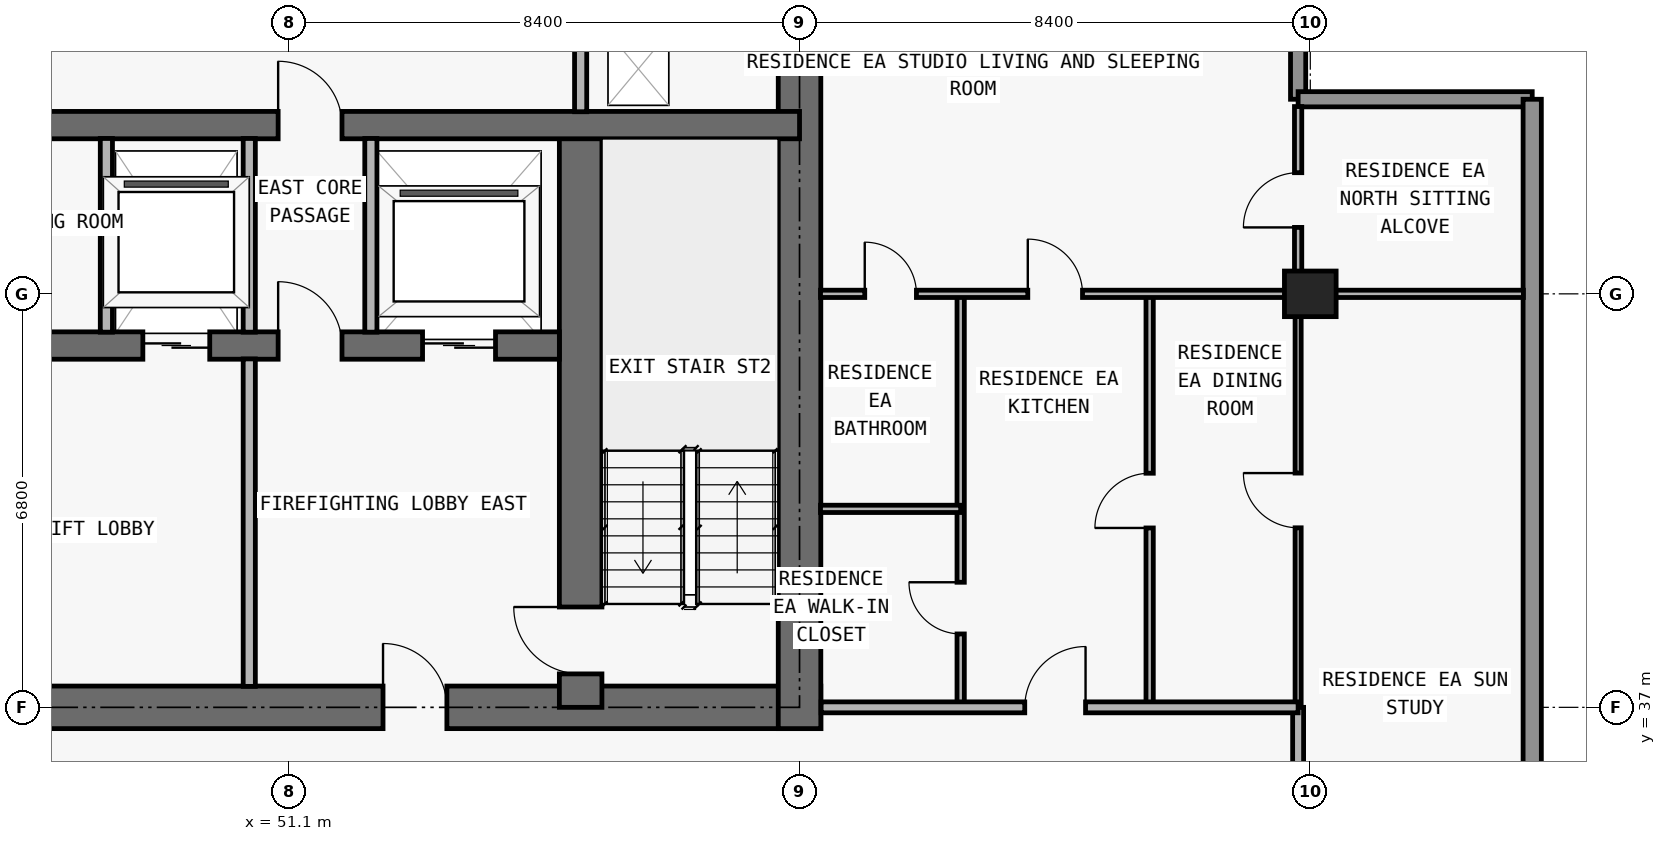
"""IFC4 building model, lengths in metres.
Left out: names, types, materials, properties, quantities, classifications, styles, units other than length and angle.
Written with IfcOpenShell. Run it as: python <this file> out.ifc"""

import sys

from ifc_helpers import new_model, si_unit, direction, frame, frame_2d, origin, origin_2d, place, context, subcontext, project, spatial, rectangle, extrude, element, fill, save


model = new_model("IFC4")
c1 = context("Model", 3, precision=1e-05, world=origin(), true_north=direction((0.0, 1.0)))
c2 = subcontext(c1, "Body", "Model", "MODEL_VIEW")
j1 = project(units=[si_unit("LENGTHUNIT", "METRE"), si_unit("PLANEANGLEUNIT", "RADIAN")], contexts=[c1])
p1 = place(None, origin())
s1 = spatial("IfcSite", under=j1, at=p1, CompositionType="ELEMENT")
p2 = place(p1, origin())
s2 = spatial("IfcBuilding", under=s1, at=p2, CompositionType="ELEMENT")
p3 = place(p2, frame((0.0, 0.0, 218.1)))
s3 = spatial("IfcBuildingStorey", under=s2, at=p3, CompositionType="ELEMENT", Elevation=218.1)
p4 = place(p3, frame((67.9, 43.8, 0.0), z_axis=(0.0, 0.0, 1.0), x_axis=(1.0, 0.0, 0.0)))
e1 = element("IfcColumn", 1, at=p4, inside=s3, PredefinedType="COLUMN", context=c2, shape_type="SweptSolid", body=[
    extrude(rectangle(XDim=0.85, YDim=0.75, at=origin_2d()), origin(), (0.0, 0.0, 1.0), 3.0),
])
p5 = place(p3, frame((17.95, 37.0, 0.0), z_axis=(0.0, 0.0, 1.0), x_axis=(1.0, 0.0, 0.0)))
e2 = element("IfcWall", 2, at=p5, inside=s3, PredefinedType="SHEAR", context=c2, shape_type="SweptSolid", body=[
    extrude(rectangle(XDim=41.9, YDim=0.7, at=frame_2d((20.95, 0.0))), origin(), (0.0, 0.0, 1.0), 3.0),
])
p6 = place(p5, frame((14.35, 0.0, 0.0)))
e3 = element("IfcOpeningElement", 3, at=p6, cuts=e2, PredefinedType="OPENING", context=c2, shape_type="SweptSolid", body=[
    extrude(rectangle(XDim=1.1, YDim=2.15, at=frame_2d((0.55, 1.075))), frame((0.0, 0.36, 0.0), z_axis=(0.0, -1.0, 0.0), x_axis=(1.0, 0.0, 0.0)), (0.0, 0.0, 1.0), 0.72),
])
p7 = place(p5, frame((6.2, 0.0, 0.0)))
e4 = element("IfcOpeningElement", 4, at=p7, cuts=e2, PredefinedType="OPENING", context=c2, shape_type="SweptSolid", body=[
    extrude(rectangle(XDim=1.05, YDim=2.15, at=frame_2d((0.525, 1.075))), frame((0.0, 0.36, 0.0), z_axis=(0.0, -1.0, 0.0), x_axis=(1.0, 0.0, 0.0)), (0.0, 0.0, 1.0), 0.72),
])
p8 = place(p5, frame((34.7, 0.0, 0.0)))
e5 = element("IfcOpeningElement", 5, at=p8, cuts=e2, PredefinedType="OPENING", context=c2, shape_type="SweptSolid", body=[
    extrude(rectangle(XDim=1.05, YDim=2.15, at=frame_2d((0.525, 1.075))), frame((0.0, 0.36, 0.0), z_axis=(0.0, -1.0, 0.0), x_axis=(1.0, 0.0, 0.0)), (0.0, 0.0, 1.0), 0.72),
])
p9 = place(p5, frame((10.812, 0.0, 0.0)))
e6 = element("IfcOpeningElement", 6, at=p9, cuts=e2, PredefinedType="OPENING", context=c2, shape_type="SweptSolid", body=[
    extrude(rectangle(XDim=1.05, YDim=2.15, at=frame_2d((0.525, 1.075))), frame((0.0, 0.36, 0.0), z_axis=(0.0, -1.0, 0.0), x_axis=(1.0, 0.0, 0.0)), (0.0, 0.0, 1.0), 0.72),
])
p10 = place(p5, frame((24.05, 0.0, 0.0)))
e7 = element("IfcOpeningElement", 7, at=p10, cuts=e2, PredefinedType="OPENING", context=c2, shape_type="SweptSolid", body=[
    extrude(rectangle(XDim=1.05, YDim=2.15, at=frame_2d((0.525, 1.075))), frame((0.0, 0.36, 0.0), z_axis=(0.0, -1.0, 0.0), x_axis=(1.0, 0.0, 0.0)), (0.0, 0.0, 1.0), 0.72),
])
p11 = place(p3, frame((59.5, 36.65, 0.0), z_axis=(0.0, 0.0, 1.0), x_axis=(0.0, 1.0, 0.0)))
e8 = element("IfcWall", 8, at=p11, inside=s3, PredefinedType="SHEAR", context=c2, shape_type="SweptSolid", body=[
    extrude(rectangle(XDim=13.95, YDim=0.7, at=frame_2d((6.975, 0.0))), origin(), (0.0, 0.0, 1.0), 3.0),
])
p12 = place(p3, frame((55.9, 37.0, 0.0), z_axis=(0.0, 0.0, 1.0), x_axis=(0.0, 1.0, 0.0)))
e9 = element("IfcWall", 9, at=p12, inside=s3, PredefinedType="SHEAR", context=c2, shape_type="SweptSolid", body=[
    extrude(rectangle(XDim=9.575, YDim=0.7, at=frame_2d((4.788, 0.0))), origin(), (0.0, 0.0, 1.0), 3.0),
])
p13 = place(p12, frame((0.55, 0.0, 0.0)))
e10 = element("IfcOpeningElement", 10, at=p13, cuts=e9, PredefinedType="OPENING", context=c2, shape_type="SweptSolid", body=[
    extrude(rectangle(XDim=1.1, YDim=2.15, at=frame_2d((0.55, 1.075))), frame((0.0, 0.36, 0.0), z_axis=(0.0, -1.0, 0.0), x_axis=(1.0, 0.0, 0.0)), (0.0, 0.0, 1.0), 0.72),
])
p14 = place(p3, frame((22.25, 42.95, 0.0), z_axis=(0.0, 0.0, 1.0), x_axis=(1.0, 0.0, 0.0)))
e11 = element("IfcWall", 11, at=p14, inside=s3, PredefinedType="SHEAR", context=c2, shape_type="SweptSolid", body=[
    extrude(rectangle(XDim=33.3, YDim=0.45, at=frame_2d((16.65, 0.0))), origin(), (0.0, 0.0, 1.0), 3.0),
])
p15 = place(p14, frame((1.05, 0.0, 0.0)))
e12 = element("IfcOpeningElement", 12, at=p15, cuts=e11, PredefinedType="OPENING", context=c2, shape_type="SweptSolid", body=[
    extrude(rectangle(XDim=1.2, YDim=2.2, at=frame_2d((0.6, 1.1))), frame((0.0, 0.235, 0.0), z_axis=(0.0, -1.0, 0.0), x_axis=(1.0, 0.0, 0.0)), (0.0, 0.0, 1.0), 0.47),
])
p16 = place(p14, frame((31.05, 0.0, 0.0)))
e13 = element("IfcOpeningElement", 13, at=p16, cuts=e11, PredefinedType="OPENING", context=c2, shape_type="SweptSolid", body=[
    extrude(rectangle(XDim=1.2, YDim=2.2, at=frame_2d((0.6, 1.1))), frame((0.0, 0.235, 0.0), z_axis=(0.0, -1.0, 0.0), x_axis=(1.0, 0.0, 0.0)), (0.0, 0.0, 1.0), 0.47),
])
p17 = place(p14, frame((26.45, 0.0, 0.0)))
e14 = element("IfcOpeningElement", 14, at=p17, cuts=e11, PredefinedType="OPENING", context=c2, shape_type="SweptSolid", body=[
    extrude(rectangle(XDim=1.1, YDim=2.2, at=frame_2d((0.55, 1.1))), frame((0.0, 0.235, 0.0), z_axis=(0.0, -1.0, 0.0), x_axis=(1.0, 0.0, 0.0)), (0.0, 0.0, 1.0), 0.47),
])
p18 = place(p14, frame((5.95, 0.0, 0.0)))
e15 = element("IfcOpeningElement", 15, at=p18, cuts=e11, PredefinedType="OPENING", context=c2, shape_type="SweptSolid", body=[
    extrude(rectangle(XDim=1.1, YDim=2.2, at=frame_2d((0.55, 1.1))), frame((0.0, 0.235, 0.0), z_axis=(0.0, -1.0, 0.0), x_axis=(1.0, 0.0, 0.0)), (0.0, 0.0, 1.0), 0.47),
])
p19 = place(p14, frame((3.625, 0.0, 0.0)))
e16 = element("IfcOpeningElement", 16, at=p19, cuts=e11, PredefinedType="OPENING", context=c2, shape_type="SweptSolid", body=[
    extrude(rectangle(XDim=1.05, YDim=2.15, at=frame_2d((0.525, 1.075))), frame((0.0, 0.235, 0.0), z_axis=(0.0, -1.0, 0.0), x_axis=(1.0, 0.0, 0.0)), (0.0, 0.0, 1.0), 0.47),
])
p20 = place(p14, frame((28.675, 0.0, 0.0)))
e17 = element("IfcOpeningElement", 17, at=p20, cuts=e11, PredefinedType="OPENING", context=c2, shape_type="SweptSolid", body=[
    extrude(rectangle(XDim=1.05, YDim=2.15, at=frame_2d((0.525, 1.075))), frame((0.0, 0.235, 0.0), z_axis=(0.0, -1.0, 0.0), x_axis=(1.0, 0.0, 0.0)), (0.0, 0.0, 1.0), 0.47),
])
p21 = place(p14, frame((15.225, 0.0, 0.0)))
e18 = element("IfcOpeningElement", 18, at=p21, cuts=e11, PredefinedType="OPENING", context=c2, shape_type="SweptSolid", body=[
    extrude(rectangle(XDim=1.0, YDim=2.2, at=frame_2d((0.5, 1.1))), frame((0.0, 0.235, 0.0), z_axis=(0.0, -1.0, 0.0), x_axis=(1.0, 0.0, 0.0)), (0.0, 0.0, 1.0), 0.47),
])
p22 = place(p14, frame((21.975, 0.0, 0.0)))
e19 = element("IfcOpeningElement", 19, at=p22, cuts=e11, PredefinedType="OPENING", context=c2, shape_type="SweptSolid", body=[
    extrude(rectangle(XDim=1.0, YDim=2.2, at=frame_2d((0.5, 1.1))), frame((0.0, 0.235, 0.0), z_axis=(0.0, -1.0, 0.0), x_axis=(1.0, 0.0, 0.0)), (0.0, 0.0, 1.0), 0.47),
])
p23 = place(p3, frame((18.3, 46.575, 0.0), z_axis=(0.0, 0.0, 1.0), x_axis=(1.0, 0.0, 0.0)))
e20 = element("IfcWall", 20, at=p23, inside=s3, PredefinedType="SHEAR", context=c2, shape_type="SweptSolid", body=[
    extrude(rectangle(XDim=41.2, YDim=0.45, at=frame_2d((20.6, 0.0))), origin(), (0.0, 0.0, 1.0), 3.0),
])
p24 = place(p23, frame((7.575, 0.0, 0.0)))
e21 = element("IfcOpeningElement", 21, at=p24, cuts=e20, PredefinedType="OPENING", context=c2, shape_type="SweptSolid", body=[
    extrude(rectangle(XDim=1.05, YDim=2.15, at=frame_2d((0.525, 1.075))), frame((0.0, 0.235, 0.0), z_axis=(0.0, -1.0, 0.0), x_axis=(1.0, 0.0, 0.0)), (0.0, 0.0, 1.0), 0.47),
])
p25 = place(p23, frame((32.625, 0.0, 0.0)))
e22 = element("IfcOpeningElement", 22, at=p25, cuts=e20, PredefinedType="OPENING", context=c2, shape_type="SweptSolid", body=[
    extrude(rectangle(XDim=1.05, YDim=2.15, at=frame_2d((0.525, 1.075))), frame((0.0, 0.235, 0.0), z_axis=(0.0, -1.0, 0.0), x_axis=(1.0, 0.0, 0.0)), (0.0, 0.0, 1.0), 0.47),
])
p26 = place(p3, frame((67.7, 50.45, 0.0), z_axis=(0.0, 0.0, 1.0), x_axis=(0.0, -1.0, 0.0)))
e23 = element("IfcWall", 23, at=p26, inside=s3, PredefinedType="ELEMENTEDWALL", context=c2, shape_type="SweptSolid", body=[
    extrude(rectangle(XDim=3.45, YDim=0.25, at=frame_2d((1.725, 0.0))), origin(), (0.0, 0.0, 1.0), 3.0),
])
p27 = place(p3, frame((67.7, 47.0, 0.0), z_axis=(0.0, 0.0, 1.0), x_axis=(1.0, 0.0, 0.0)))
e24 = element("IfcWall", 24, at=p27, inside=s3, PredefinedType="ELEMENTEDWALL", context=c2, shape_type="SweptSolid", body=[
    extrude(rectangle(XDim=3.85, YDim=0.25, at=frame_2d((1.925, 0.0))), origin(), (0.0, 0.0, 1.0), 3.0),
])
p28 = place(p3, frame((71.55, 47.0, 0.0), z_axis=(0.0, 0.0, 1.0), x_axis=(0.0, -1.0, 0.0)))
e25 = element("IfcWall", 25, at=p28, inside=s3, PredefinedType="STANDARD", context=c2, shape_type="SweptSolid", body=[
    extrude(rectangle(XDim=17.9, YDim=0.3, at=frame_2d((8.95, 0.0))), origin(), (0.0, 0.0, 1.0), 3.0),
])
p29 = place(p3, frame((48.1, 43.17, 0.0), z_axis=(0.0, 0.0, 1.0), x_axis=(0.0, 1.0, 0.0)))
e26 = element("IfcWall", 26, at=p29, inside=s3, PredefinedType="PARTITIONING", context=c2, shape_type="SweptSolid", body=[
    extrude(rectangle(XDim=3.185, YDim=0.2, at=frame_2d((1.593, 0.0))), origin(), (0.0, 0.0, 1.0), 3.0),
])
p30 = place(p3, frame((50.45, 37.345, 0.0), z_axis=(0.0, 0.0, 1.0), x_axis=(0.0, 1.0, 0.0)))
e27 = element("IfcWall", 27, at=p30, inside=s3, PredefinedType="PARTITIONING", context=c2, shape_type="SweptSolid", body=[
    extrude(rectangle(XDim=5.385, YDim=0.2, at=frame_2d((2.692, 0.0))), origin(), (0.0, 0.0, 1.0), 3.0),
])
for number, where, z_axis, x_axis in (
    (28, (50.45, 43.17, 0.0), (0.0, 0.0, 1.0), (0.0, 1.0, 0.0)),
    (29, (52.45, 43.17, 0.0), (0.0, 0.0, 1.0), (0.0, 1.0, 0.0)),
):
    element("IfcWall", number, at=place(p3, frame(where, z_axis=z_axis, x_axis=x_axis)), inside=s3, PredefinedType="PARTITIONING", context=c2, shape_type="SweptSolid", body=[
        extrude(rectangle(XDim=3.185, YDim=0.2, at=frame_2d((1.593, 0.0))), origin(), (0.0, 0.0, 1.0), 3.0),
    ])
p31 = place(p3, frame((55.9, 46.795, 0.0), z_axis=(0.0, 0.0, 1.0), x_axis=(0.0, 1.0, 0.0)))
e30 = element("IfcWall", 30, at=p31, inside=s3, PredefinedType="PARTITIONING", context=c2, shape_type="SweptSolid", body=[
    extrude(rectangle(XDim=3.16, YDim=0.2, at=frame_2d((1.58, 0.0))), origin(), (0.0, 0.0, 1.0), 3.0),
])
p32 = place(p3, frame((62.15, 37.0, 0.0), z_axis=(0.0, 0.0, 1.0), x_axis=(0.0, 1.0, 0.0)))
e31 = element("IfcWall", 31, at=p32, inside=s3, PredefinedType="PARTITIONING", context=c2, shape_type="SweptSolid", body=[
    extrude(rectangle(XDim=6.8, YDim=0.12, at=frame_2d((3.4, 0.0))), origin(), (0.0, 0.0, 1.0), 3.0),
])
p33 = place(p32, frame((1.207, 0.0, 0.0)))
e32 = element("IfcOpeningElement", 32, at=p33, cuts=e31, PredefinedType="OPENING", context=c2, shape_type="SweptSolid", body=[
    extrude(rectangle(XDim=0.85, YDim=2.1, at=frame_2d((0.425, 1.05))), frame((0.0, 0.07, 0.0), z_axis=(0.0, -1.0, 0.0), x_axis=(1.0, 0.0, 0.0)), (0.0, 0.0, 1.0), 0.14),
])
p34 = place(p3, frame((65.258, 37.0, 0.0), z_axis=(0.0, 0.0, 1.0), x_axis=(0.0, 1.0, 0.0)))
e33 = element("IfcWall", 33, at=p34, inside=s3, PredefinedType="PARTITIONING", context=c2, shape_type="SweptSolid", body=[
    extrude(rectangle(XDim=6.8, YDim=0.12, at=frame_2d((3.4, 0.0))), origin(), (0.0, 0.0, 1.0), 3.0),
])
p35 = place(p34, frame((2.95, 0.0, 0.0)))
e34 = element("IfcOpeningElement", 34, at=p35, cuts=e33, PredefinedType="OPENING", context=c2, shape_type="SweptSolid", body=[
    extrude(rectangle(XDim=0.9, YDim=2.15, at=frame_2d((0.45, 1.075))), frame((0.0, 0.07, 0.0), z_axis=(0.0, -1.0, 0.0), x_axis=(1.0, 0.0, 0.0)), (0.0, 0.0, 1.0), 0.14),
])
p36 = place(p3, frame((67.7, 34.405, 0.0), z_axis=(0.0, 0.0, 1.0), x_axis=(0.0, 1.0, 0.0)))
e35 = element("IfcWall", 35, at=p36, inside=s3, PredefinedType="PARTITIONING", context=c2, shape_type="SweptSolid", body=[
    extrude(rectangle(XDim=2.595, YDim=0.18, at=frame_2d((1.297, 0.0))), origin(), (0.0, 0.0, 1.0), 2.213),
])
p37 = place(p3, frame((67.7, 37.005, 0.0), z_axis=(0.0, 0.0, 1.0), x_axis=(0.0, 1.0, 0.0)))
e36 = element("IfcWall", 36, at=p37, inside=s3, PredefinedType="MOVABLE", context=c2, shape_type="SweptSolid", body=[
    extrude(rectangle(XDim=6.795, YDim=0.1, at=frame_2d((3.397, 0.0))), origin(), (0.0, 0.0, 1.0), 2.213),
])
p38 = place(p37, frame((2.948, 0.0, 0.0)))
e37 = element("IfcOpeningElement", 37, at=p38, cuts=e36, PredefinedType="OPENING", context=c2, shape_type="SweptSolid", body=[
    extrude(rectangle(XDim=0.9, YDim=2.15, at=frame_2d((0.45, 1.075))), frame((0.0, 0.06, 0.0), z_axis=(0.0, -1.0, 0.0), x_axis=(1.0, 0.0, 0.0)), (0.0, 0.0, 1.0), 0.12),
])
p39 = place(p3, frame((67.7, 43.805, 0.0), z_axis=(0.0, 0.0, 1.0), x_axis=(0.0, 1.0, 0.0)))
e38 = element("IfcWall", 38, at=p39, inside=s3, PredefinedType="PARTITIONING", context=c2, shape_type="SweptSolid", body=[
    extrude(rectangle(XDim=3.075, YDim=0.12, at=frame_2d((1.538, 0.0))), origin(), (0.0, 0.0, 1.0), 3.0),
])
p40 = place(p39, frame((1.087, 0.0, 0.0)))
e39 = element("IfcOpeningElement", 39, at=p40, cuts=e38, PredefinedType="OPENING", context=c2, shape_type="SweptSolid", body=[
    extrude(rectangle(XDim=0.9, YDim=2.15, at=frame_2d((0.45, 1.075))), frame((0.0, 0.07, 0.0), z_axis=(0.0, -1.0, 0.0), x_axis=(1.0, 0.0, 0.0)), (0.0, 0.0, 1.0), 0.14),
])
p41 = place(p3, frame((59.855, 37.0, 0.0), z_axis=(0.0, 0.0, 1.0), x_axis=(1.0, 0.0, 0.0)))
e40 = element("IfcWall", 40, at=p41, inside=s3, PredefinedType="PARTITIONING", context=c2, shape_type="SweptSolid", body=[
    extrude(rectangle(XDim=7.845, YDim=0.18, at=frame_2d((3.922, 0.0))), origin(), (0.0, 0.0, 1.0), 3.0),
])
p42 = place(p41, frame((3.349, 0.0, 0.0)))
e41 = element("IfcOpeningElement", 41, at=p42, cuts=e40, PredefinedType="OPENING", context=c2, shape_type="SweptSolid", body=[
    extrude(rectangle(XDim=1.0, YDim=2.2, at=frame_2d((0.5, 1.1))), frame((0.0, 0.1, 0.0), z_axis=(0.0, -1.0, 0.0), x_axis=(1.0, 0.0, 0.0)), (0.0, 0.0, 1.0), 0.2),
])
p43 = place(p3, frame((59.845, 40.264, 0.0), z_axis=(0.0, 0.0, 1.0), x_axis=(1.0, 0.0, 0.0)))
e42 = element("IfcWall", 42, at=p43, inside=s3, PredefinedType="PARTITIONING", context=c2, shape_type="SweptSolid", body=[
    extrude(rectangle(XDim=2.305, YDim=0.12, at=frame_2d((1.152, 0.0))), origin(), (0.0, 0.0, 1.0), 3.0),
])
p44 = place(p3, frame((59.845, 43.8, 0.0), z_axis=(0.0, 0.0, 1.0), x_axis=(1.0, 0.0, 0.0)))
e43 = element("IfcWall", 43, at=p44, inside=s3, PredefinedType="PARTITIONING", context=c2, shape_type="SweptSolid", body=[
    extrude(rectangle(XDim=11.56, YDim=0.12, at=frame_2d((5.78, 0.0))), origin(), (0.0, 0.0, 1.0), 2.368),
])
p45 = place(p44, frame((3.409, 0.0, 0.0)))
e44 = element("IfcOpeningElement", 44, at=p45, cuts=e43, PredefinedType="OPENING", context=c2, shape_type="SweptSolid", body=[
    extrude(rectangle(XDim=0.9, YDim=2.15, at=frame_2d((0.45, 1.075))), frame((0.0, 0.07, 0.0), z_axis=(0.0, -1.0, 0.0), x_axis=(1.0, 0.0, 0.0)), (0.0, 0.0, 1.0), 0.14),
])
p46 = place(p44, frame((0.728, 0.0, 0.0)))
e45 = element("IfcOpeningElement", 45, at=p46, cuts=e43, PredefinedType="OPENING", context=c2, shape_type="SweptSolid", body=[
    extrude(rectangle(XDim=0.85, YDim=2.1, at=frame_2d((0.425, 1.05))), frame((0.0, 0.07, 0.0), z_axis=(0.0, -1.0, 0.0), x_axis=(1.0, 0.0, 0.0)), (0.0, 0.0, 1.0), 0.14),
])
p47 = place(p16, origin())
e46 = element("IfcDoor", 46, at=p47, inside=s3, OperationType="DOUBLE_DOOR_SLIDING", PredefinedType="DOOR", context=c2, shape_type="SweptSolid", body=[
    extrude(rectangle(XDim=1.2, YDim=2.2, at=frame_2d((0.6, 1.1))), frame((0.0, 0.025, 0.0), z_axis=(0.0, -1.0, 0.0), x_axis=(1.0, 0.0, 0.0)), (0.0, 0.0, 1.0), 0.05),
])
fill(e13, e46)
p48 = place(p17, origin())
e47 = element("IfcDoor", 47, at=p48, inside=s3, OperationType="DOUBLE_DOOR_SLIDING", PredefinedType="DOOR", context=c2, shape_type="SweptSolid", body=[
    extrude(rectangle(XDim=1.1, YDim=2.2, at=frame_2d((0.55, 1.1))), frame((0.0, 0.025, 0.0), z_axis=(0.0, -1.0, 0.0), x_axis=(1.0, 0.0, 0.0)), (0.0, 0.0, 1.0), 0.05),
])
fill(e14, e47)
p49 = place(p8, origin())
e48 = element("IfcDoor", 48, at=p49, inside=s3, OperationType="SINGLE_SWING_LEFT", PredefinedType="DOOR", context=c2, shape_type="SweptSolid", body=[
    extrude(rectangle(XDim=1.05, YDim=2.15, at=frame_2d((0.525, 1.075))), frame((0.0, 0.025, 0.0), z_axis=(0.0, -1.0, 0.0), x_axis=(1.0, 0.0, 0.0)), (0.0, 0.0, 1.0), 0.05),
])
fill(e5, e48)
p50 = place(p13, origin())
e49 = element("IfcDoor", 49, at=p50, inside=s3, OperationType="SINGLE_SWING_RIGHT", PredefinedType="DOOR", context=c2, shape_type="SweptSolid", body=[
    extrude(rectangle(XDim=1.1, YDim=2.15, at=frame_2d((0.55, 1.075))), frame((0.0, 0.025, 0.0), z_axis=(0.0, -1.0, 0.0), x_axis=(1.0, 0.0, 0.0)), (0.0, 0.0, 1.0), 0.05),
])
fill(e10, e49)
p51 = place(p20, origin())
e50 = element("IfcDoor", 50, at=p51, inside=s3, OperationType="SINGLE_SWING_LEFT", PredefinedType="DOOR", context=c2, shape_type="SweptSolid", body=[
    extrude(rectangle(XDim=1.05, YDim=2.15, at=frame_2d((0.525, 1.075))), frame((0.0, 0.025, 0.0), z_axis=(0.0, -1.0, 0.0), x_axis=(1.0, 0.0, 0.0)), (0.0, 0.0, 1.0), 0.05),
])
fill(e17, e50)
p52 = place(p25, origin())
e51 = element("IfcDoor", 51, at=p52, inside=s3, OperationType="SINGLE_SWING_LEFT", PredefinedType="DOOR", context=c2, shape_type="SweptSolid", body=[
    extrude(rectangle(XDim=1.05, YDim=2.15, at=frame_2d((0.525, 1.075))), frame((0.0, 0.025, 0.0), z_axis=(0.0, -1.0, 0.0), x_axis=(1.0, 0.0, 0.0)), (0.0, 0.0, 1.0), 0.05),
])
fill(e22, e51)
p53 = place(p35, origin())
e52 = element("IfcDoor", 52, at=p53, inside=s3, OperationType="SINGLE_SWING_LEFT", PredefinedType="DOOR", context=c2, shape_type="SweptSolid", body=[
    extrude(rectangle(XDim=0.9, YDim=2.15, at=frame_2d((0.45, 1.075))), frame((0.0, 0.025, 0.0), z_axis=(0.0, -1.0, 0.0), x_axis=(1.0, 0.0, 0.0)), (0.0, 0.0, 1.0), 0.05),
])
fill(e34, e52)
p54 = place(p42, origin())
e53 = element("IfcDoor", 53, at=p54, inside=s3, OperationType="SINGLE_SWING_RIGHT", PredefinedType="DOOR", context=c2, shape_type="SweptSolid", body=[
    extrude(rectangle(XDim=1.0, YDim=2.2, at=frame_2d((0.5, 1.1))), frame((0.0, 0.025, 0.0), z_axis=(0.0, -1.0, 0.0), x_axis=(1.0, 0.0, 0.0)), (0.0, 0.0, 1.0), 0.05),
])
fill(e41, e53)
p55 = place(p45, origin())
e54 = element("IfcDoor", 54, at=p55, inside=s3, OperationType="SINGLE_SWING_LEFT", PredefinedType="DOOR", context=c2, shape_type="SweptSolid", body=[
    extrude(rectangle(XDim=0.9, YDim=2.15, at=frame_2d((0.45, 1.075))), frame((0.0, 0.025, 0.0), z_axis=(0.0, -1.0, 0.0), x_axis=(1.0, 0.0, 0.0)), (0.0, 0.0, 1.0), 0.05),
])
fill(e44, e54)
p56 = place(p33, origin())
e55 = element("IfcDoor", 55, at=p56, inside=s3, OperationType="SINGLE_SWING_RIGHT", PredefinedType="DOOR", context=c2, shape_type="SweptSolid", body=[
    extrude(rectangle(XDim=0.85, YDim=2.1, at=frame_2d((0.425, 1.05))), frame((0.0, 0.025, 0.0), z_axis=(0.0, -1.0, 0.0), x_axis=(1.0, 0.0, 0.0)), (0.0, 0.0, 1.0), 0.05),
])
fill(e32, e55)
p57 = place(p46, origin())
e56 = element("IfcDoor", 56, at=p57, inside=s3, OperationType="SINGLE_SWING_LEFT", PredefinedType="DOOR", context=c2, shape_type="SweptSolid", body=[
    extrude(rectangle(XDim=0.85, YDim=2.1, at=frame_2d((0.425, 1.05))), frame((0.0, 0.025, 0.0), z_axis=(0.0, -1.0, 0.0), x_axis=(1.0, 0.0, 0.0)), (0.0, 0.0, 1.0), 0.05),
])
fill(e45, e56)
p58 = place(p38, origin())
e57 = element("IfcDoor", 57, at=p58, inside=s3, OperationType="SINGLE_SWING_RIGHT", PredefinedType="DOOR", context=c2, shape_type="SweptSolid", body=[
    extrude(rectangle(XDim=0.9, YDim=2.15, at=frame_2d((0.45, 1.075))), frame((0.0, 0.025, 0.0), z_axis=(0.0, -1.0, 0.0), x_axis=(1.0, 0.0, 0.0)), (0.0, 0.0, 1.0), 0.05),
])
fill(e37, e57)
p59 = place(p40, origin())
e58 = element("IfcDoor", 58, at=p59, inside=s3, OperationType="SINGLE_SWING_LEFT", PredefinedType="DOOR", context=c2, shape_type="SweptSolid", body=[
    extrude(rectangle(XDim=0.9, YDim=2.15, at=frame_2d((0.45, 1.075))), frame((0.0, 0.025, 0.0), z_axis=(0.0, -1.0, 0.0), x_axis=(1.0, 0.0, 0.0)), (0.0, 0.0, 1.0), 0.05),
])
fill(e39, e58)
save(model, sys.argv[1])
